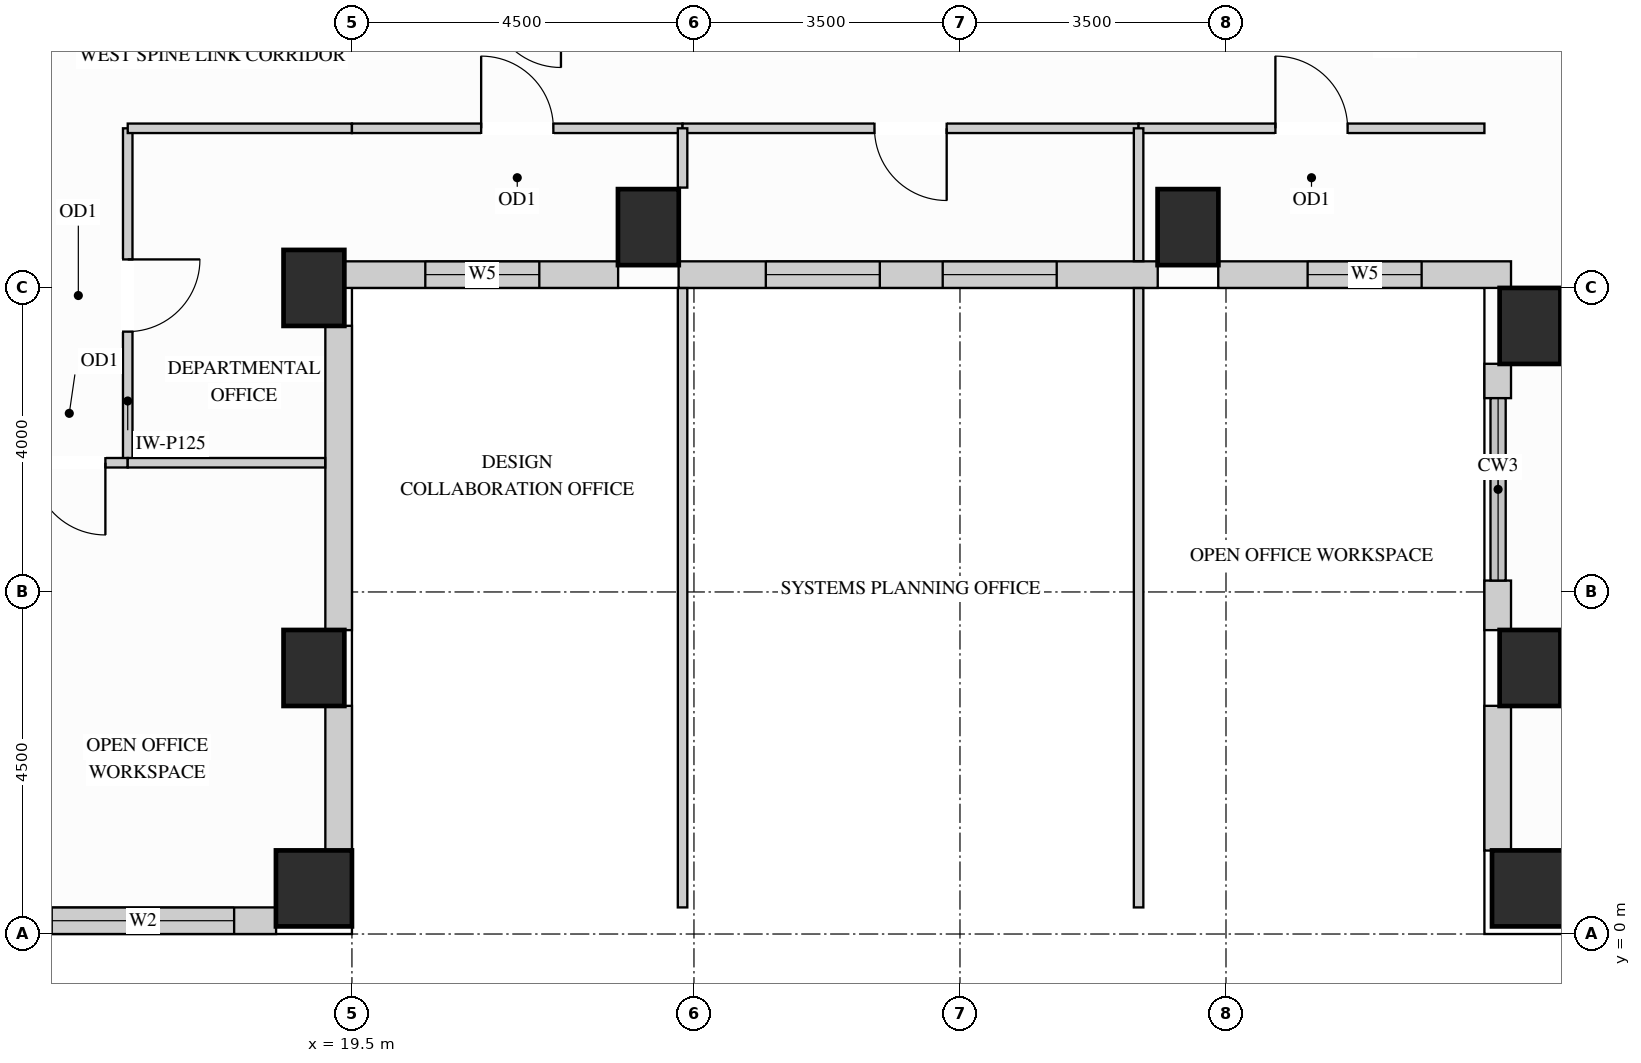
"""IFC4 building model, lengths in metres.
Left out: names, types, materials, properties, quantities, classifications, styles, units other than length and angle.
Written with IfcOpenShell. Run it as: python <this file> out.ifc"""

import sys

from ifc_helpers import new_model, si_unit, direction, frame, frame_2d, origin, origin_2d, place, context, subcontext, project, spatial, rectangle, extrude, source, transform, mapped, element, fill, save


model = new_model("IFC4")
c1 = context("Model", 3, precision=1e-05, world=origin(), true_north=direction((0.0, 1.0)))
c2 = subcontext(c1, "Body", "Model", "MODEL_VIEW")
j1 = project(units=[si_unit("LENGTHUNIT", "METRE"), si_unit("PLANEANGLEUNIT", "RADIAN")], contexts=[c1])
p1 = place(None, origin())
s1 = spatial("IfcSite", under=j1, at=p1, CompositionType="ELEMENT")
p2 = place(p1, origin())
s2 = spatial("IfcBuilding", under=s1, at=p2, CompositionType="ELEMENT")
p3 = place(p2, frame((0.0, 0.0, 204.3)))
s3 = spatial("IfcBuildingStorey", under=s2, at=p3, CompositionType="ELEMENT", Elevation=204.3)
m1 = source(origin(), c2, "Body", "SweptSolid", [
    extrude(rectangle(XDim=0.8, YDim=1.0, at=origin_2d()), origin(), (0.0, 0.0, 1.0), 3.32),
])
for number, where, z_axis, x_axis in (
    (1, (19.0, 3.5, 0.0), (0.0, 0.0, 1.0), (1.0, 0.0, 0.0)),
    (2, (19.0, 8.5, 0.0), (0.0, 0.0, 1.0), (1.0, 0.0, 0.0)),
    (3, (35.0, 3.5, 0.0), (0.0, 0.0, 1.0), (1.0, 0.0, 0.0)),
    (4, (35.0, 8.0, 0.0), (0.0, 0.0, 1.0), (1.0, 0.0, 0.0)),
    (5, (23.4, 9.3, 0.0), (0.0, 0.0, 1.0), (1.0, 0.0, 0.0)),
    (6, (30.5, 9.3, 0.0), (0.0, 0.0, 1.0), (1.0, 0.0, 0.0)),
):
    element("IfcColumn", number, at=place(p3, frame(where, z_axis=z_axis, x_axis=x_axis)), inside=s3, PredefinedType="COLUMN", context=c2, shape_type="MappedRepresentation", body=[
        mapped(m1, transform((0.0, 0.0, 0.0), x_axis=(1.0, 0.0, 0.0), y_axis=(0.0, 1.0, 0.0), z_axis=(0.0, 0.0, 1.0))),
    ])
m2 = source(origin(), c2, "Body", "SweptSolid", [
    extrude(rectangle(XDim=1.0, YDim=1.0, at=origin_2d()), origin(), (0.0, 0.0, 1.0), 3.32),
])
for number, where, z_axis, x_axis in (
    (7, (19.0, 0.6, 0.0), (0.0, 0.0, 1.0), (1.0, 0.0, 0.0)),
    (8, (35.0, 0.6, 0.0), (0.0, 0.0, 1.0), (1.0, 0.0, 0.0)),
):
    element("IfcColumn", number, at=place(p3, frame(where, z_axis=z_axis, x_axis=x_axis)), inside=s3, PredefinedType="COLUMN", context=c2, shape_type="MappedRepresentation", body=[
        mapped(m2, transform((0.0, 0.0, 0.0), x_axis=(1.0, 0.0, 0.0), y_axis=(0.0, 1.0, 0.0), z_axis=(0.0, 0.0, 1.0))),
    ])
p4 = place(p3, frame((14.998, 0.175, 0.0), z_axis=(0.0, 0.0, 1.0), x_axis=(1.0, 0.0, 0.0)))
e9 = element("IfcWall", 9, at=p4, inside=s3, PredefinedType="SOLIDWALL", context=c2, shape_type="SweptSolid", body=[
    extrude(rectangle(XDim=3.504, YDim=0.35, at=frame_2d((1.752, 0.0))), origin(), (0.0, 0.0, 1.0), 2.532),
])
p5 = place(p4, frame((0.552, 0.0, 0.78)))
e10 = element("IfcOpeningElement", 10, at=p5, cuts=e9, PredefinedType="OPENING", context=c2, shape_type="SweptSolid", body=[
    extrude(rectangle(XDim=2.4, YDim=1.572, at=frame_2d((1.2, 0.786))), frame((0.0, 0.185, 0.0), z_axis=(0.0, -1.0, 0.0), x_axis=(1.0, 0.0, 0.0)), (0.0, 0.0, 1.0), 0.37),
])
m3 = source(origin(), c2, "Body", "SweptSolid", [
    extrude(rectangle(XDim=1.904, YDim=0.35, at=frame_2d((0.952, 0.0))), origin(), (0.0, 0.0, 1.0), 2.532),
])
p6 = place(p3, frame((19.325, 1.098, 0.0), z_axis=(0.0, 0.0, 1.0), x_axis=(0.0, 1.0, 0.0)))
e11 = element("IfcWall", 11, at=p6, inside=s3, PredefinedType="SOLIDWALL", context=c2, shape_type="MappedRepresentation", body=[
    mapped(m3, transform((0.0, 0.0, 0.0), x_axis=(1.0, 0.0, 0.0), y_axis=(0.0, 1.0, 0.0), z_axis=(0.0, 0.0, 1.0))),
])
m4 = source(origin(), c2, "Body", "SweptSolid", [
    extrude(rectangle(XDim=4.004, YDim=0.35, at=frame_2d((2.002, 0.0))), origin(), (0.0, 0.0, 1.0), 2.532),
])
p7 = place(p3, frame((19.325, 3.998, 0.0), z_axis=(0.0, 0.0, 1.0), x_axis=(0.0, 1.0, 0.0)))
e12 = element("IfcWall", 12, at=p7, inside=s3, PredefinedType="SOLIDWALL", context=c2, shape_type="MappedRepresentation", body=[
    mapped(m4, transform((0.0, 0.0, 0.0), x_axis=(1.0, 0.0, 0.0), y_axis=(0.0, 1.0, 0.0), z_axis=(0.0, 0.0, 1.0))),
])
p8 = place(p3, frame((19.398, 8.675, 0.0), z_axis=(0.0, 0.0, 1.0), x_axis=(1.0, 0.0, 0.0)))
e13 = element("IfcWall", 13, at=p8, inside=s3, PredefinedType="SOLIDWALL", context=c2, shape_type="SweptSolid", body=[
    extrude(rectangle(XDim=3.604, YDim=0.35, at=frame_2d((1.802, 0.0))), origin(), (0.0, 0.0, 1.0), 3.305),
])
p9 = place(p8, frame((1.067, 0.0, 0.78)))
e14 = element("IfcOpeningElement", 14, at=p9, cuts=e13, PredefinedType="OPENING", context=c2, shape_type="SweptSolid", body=[
    extrude(rectangle(XDim=1.5, YDim=2.0, at=frame_2d((0.75, 1.0))), frame((0.0, 0.185, 0.0), z_axis=(0.0, -1.0, 0.0), x_axis=(1.0, 0.0, 0.0)), (0.0, 0.0, 1.0), 0.37),
])
p10 = place(p3, frame((23.798, 8.675, 0.0), z_axis=(0.0, 0.0, 1.0), x_axis=(1.0, 0.0, 0.0)))
e15 = element("IfcWall", 15, at=p10, inside=s3, PredefinedType="SOLIDWALL", context=c2, shape_type="SweptSolid", body=[
    extrude(rectangle(XDim=6.304, YDim=0.35, at=frame_2d((3.152, 0.0))), origin(), (0.0, 0.0, 1.0), 3.305),
])
p11 = place(p10, frame((1.147, 0.0, 0.78)))
e16 = element("IfcOpeningElement", 16, at=p11, cuts=e15, PredefinedType="OPENING", context=c2, shape_type="SweptSolid", body=[
    extrude(rectangle(XDim=1.5, YDim=2.0, at=frame_2d((0.75, 1.0))), frame((0.0, 0.185, 0.0), z_axis=(0.0, -1.0, 0.0), x_axis=(1.0, 0.0, 0.0)), (0.0, 0.0, 1.0), 0.37),
])
p12 = place(p10, frame((3.475, 0.0, 0.78)))
e17 = element("IfcOpeningElement", 17, at=p12, cuts=e15, PredefinedType="OPENING", context=c2, shape_type="SweptSolid", body=[
    extrude(rectangle(XDim=1.5, YDim=2.0, at=frame_2d((0.75, 1.0))), frame((0.0, 0.185, 0.0), z_axis=(0.0, -1.0, 0.0), x_axis=(1.0, 0.0, 0.0)), (0.0, 0.0, 1.0), 0.37),
])
p13 = place(p3, frame((30.898, 8.675, 0.0), z_axis=(0.0, 0.0, 1.0), x_axis=(1.0, 0.0, 0.0)))
e18 = element("IfcWall", 18, at=p13, inside=s3, PredefinedType="SOLIDWALL", context=c2, shape_type="SweptSolid", body=[
    extrude(rectangle(XDim=3.852, YDim=0.35, at=frame_2d((1.926, 0.0))), origin(), (0.0, 0.0, 1.0), 3.305),
])
p14 = place(p13, frame((1.176, 0.0, 0.78)))
e19 = element("IfcOpeningElement", 19, at=p14, cuts=e18, PredefinedType="OPENING", context=c2, shape_type="SweptSolid", body=[
    extrude(rectangle(XDim=1.5, YDim=2.0, at=frame_2d((0.75, 1.0))), frame((0.0, 0.185, 0.0), z_axis=(0.0, -1.0, 0.0), x_axis=(1.0, 0.0, 0.0)), (0.0, 0.0, 1.0), 0.37),
])
m5 = source(origin(), c2, "Body", "SweptSolid", [
    extrude(rectangle(XDim=0.452, YDim=0.35, at=frame_2d((0.226, 0.0))), origin(), (0.0, 0.0, 1.0), 2.532),
])
p15 = place(p3, frame((34.575, 7.502, 0.0), z_axis=(0.0, 0.0, 1.0), x_axis=(0.0, -1.0, 0.0)))
e20 = element("IfcWall", 20, at=p15, inside=s3, PredefinedType="SOLIDWALL", context=c2, shape_type="MappedRepresentation", body=[
    mapped(m5, transform((0.0, 0.0, 0.0), x_axis=(1.0, 0.0, 0.0), y_axis=(0.0, 1.0, 0.0), z_axis=(0.0, 0.0, 1.0))),
])
m6 = source(origin(), c2, "Body", "SweptSolid", [
    extrude(rectangle(XDim=0.652, YDim=0.35, at=frame_2d((0.326, 0.0))), origin(), (0.0, 0.0, 1.0), 2.532),
])
p16 = place(p3, frame((34.575, 4.65, 0.0), z_axis=(0.0, 0.0, 1.0), x_axis=(0.0, -1.0, 0.0)))
e21 = element("IfcWall", 21, at=p16, inside=s3, PredefinedType="SOLIDWALL", context=c2, shape_type="MappedRepresentation", body=[
    mapped(m6, transform((0.0, 0.0, 0.0), x_axis=(1.0, 0.0, 0.0), y_axis=(0.0, 1.0, 0.0), z_axis=(0.0, 0.0, 1.0))),
])
p17 = place(p3, frame((34.575, 3.002, 0.0), z_axis=(0.0, 0.0, 1.0), x_axis=(0.0, -1.0, 0.0)))
e22 = element("IfcWall", 22, at=p17, inside=s3, PredefinedType="SOLIDWALL", context=c2, shape_type="MappedRepresentation", body=[
    mapped(m3, transform((0.0, 0.0, 0.0), x_axis=(1.0, 0.0, 0.0), y_axis=(0.0, 1.0, 0.0), z_axis=(0.0, 0.0, 1.0))),
])
p18 = place(p3, frame((16.55, 6.2, 0.0), z_axis=(0.0, 0.0, 1.0), x_axis=(0.0, 1.0, 0.0)))
e23 = element("IfcWall", 23, at=p18, inside=s3, PredefinedType="PARTITIONING", context=c2, shape_type="SweptSolid", body=[
    extrude(rectangle(XDim=4.4, YDim=0.125, at=frame_2d((2.2, 0.0))), origin(), (0.0, 0.0, 1.0), 3.305),
])
p19 = place(p18, frame((1.725, 0.0, 0.0)))
e24 = element("IfcOpeningElement", 24, at=p19, cuts=e23, PredefinedType="OPENING", context=c2, shape_type="SweptSolid", body=[
    extrude(rectangle(XDim=0.95, YDim=2.15, at=frame_2d((0.475, 1.075))), frame((0.0, 0.073, 0.0), z_axis=(0.0, -1.0, 0.0), x_axis=(1.0, 0.0, 0.0)), (0.0, 0.0, 1.0), 0.145),
])
m7 = source(origin(), c2, "Body", "SweptSolid", [
    extrude(rectangle(XDim=2.95, YDim=0.125, at=frame_2d((1.475, 0.0))), origin(), (0.0, 0.0, 1.0), 3.305),
])
p20 = place(p3, frame((16.55, 10.6, 0.0), z_axis=(0.0, 0.0, 1.0), x_axis=(1.0, 0.0, 0.0)))
e25 = element("IfcWall", 25, at=p20, inside=s3, PredefinedType="PARTITIONING", context=c2, shape_type="MappedRepresentation", body=[
    mapped(m7, transform((0.0, 0.0, 0.0), x_axis=(1.0, 0.0, 0.0), y_axis=(0.0, 1.0, 0.0), z_axis=(0.0, 0.0, 1.0))),
])
p21 = place(p3, frame((19.5, 10.6, 0.0), z_axis=(0.0, 0.0, 1.0), x_axis=(1.0, 0.0, 0.0)))
e26 = element("IfcWall", 26, at=p21, inside=s3, PredefinedType="PARTITIONING", context=c2, shape_type="SweptSolid", body=[
    extrude(rectangle(XDim=4.35, YDim=0.125, at=frame_2d((2.175, 0.0))), origin(), (0.0, 0.0, 1.0), 3.305),
])
p22 = place(p21, frame((1.7, 0.0, 0.0)))
e27 = element("IfcOpeningElement", 27, at=p22, cuts=e26, PredefinedType="OPENING", context=c2, shape_type="SweptSolid", body=[
    extrude(rectangle(XDim=0.95, YDim=2.15, at=frame_2d((0.475, 1.075))), frame((0.0, 0.073, 0.0), z_axis=(0.0, -1.0, 0.0), x_axis=(1.0, 0.0, 0.0)), (0.0, 0.0, 1.0), 0.145),
])
p23 = place(p3, frame((23.85, 10.6, 0.0), z_axis=(0.0, 0.0, 1.0), x_axis=(1.0, 0.0, 0.0)))
e28 = element("IfcWall", 28, at=p23, inside=s3, PredefinedType="PARTITIONING", context=c2, shape_type="SweptSolid", body=[
    extrude(rectangle(XDim=6.0, YDim=0.125, at=frame_2d((3.0, 0.0))), origin(), (0.0, 0.0, 1.0), 3.305),
])
p24 = place(p23, frame((2.525, 0.0, 0.0)))
e29 = element("IfcOpeningElement", 29, at=p24, cuts=e28, PredefinedType="OPENING", context=c2, shape_type="SweptSolid", body=[
    extrude(rectangle(XDim=0.95, YDim=2.15, at=frame_2d((0.475, 1.075))), frame((0.0, 0.073, 0.0), z_axis=(0.0, -1.0, 0.0), x_axis=(1.0, 0.0, 0.0)), (0.0, 0.0, 1.0), 0.145),
])
p25 = place(p3, frame((29.85, 10.6, 0.0), z_axis=(0.0, 0.0, 1.0), x_axis=(1.0, 0.0, 0.0)))
e30 = element("IfcWall", 30, at=p25, inside=s3, PredefinedType="PARTITIONING", context=c2, shape_type="SweptSolid", body=[
    extrude(rectangle(XDim=4.55, YDim=0.125, at=frame_2d((2.275, 0.0))), origin(), (0.0, 0.0, 1.0), 3.305),
])
p26 = place(p25, frame((1.8, 0.0, 0.0)))
e31 = element("IfcOpeningElement", 31, at=p26, cuts=e30, PredefinedType="OPENING", context=c2, shape_type="SweptSolid", body=[
    extrude(rectangle(XDim=0.95, YDim=2.15, at=frame_2d((0.475, 1.075))), frame((0.0, 0.073, 0.0), z_axis=(0.0, -1.0, 0.0), x_axis=(1.0, 0.0, 0.0)), (0.0, 0.0, 1.0), 0.145),
])
m8 = source(origin(), c2, "Body", "SweptSolid", [
    extrude(rectangle(XDim=8.148, YDim=0.125, at=frame_2d((4.074, 0.0))), origin(), (0.0, 0.0, 1.0), 3.305),
])
p27 = place(p3, frame((23.85, 0.35, 0.0), z_axis=(0.0, 0.0, 1.0), x_axis=(0.0, 1.0, 0.0)))
e32 = element("IfcWall", 32, at=p27, inside=s3, PredefinedType="PARTITIONING", context=c2, shape_type="MappedRepresentation", body=[
    mapped(m8, transform((0.0, 0.0, 0.0), x_axis=(1.0, 0.0, 0.0), y_axis=(0.0, 1.0, 0.0), z_axis=(0.0, 0.0, 1.0))),
])
m9 = source(origin(), c2, "Body", "SweptSolid", [
    extrude(rectangle(XDim=0.78, YDim=0.125, at=frame_2d((0.39, 0.0))), origin(), (0.0, 0.0, 1.0), 3.305),
])
p28 = place(p3, frame((23.85, 9.82, 0.0), z_axis=(0.0, 0.0, 1.0), x_axis=(0.0, 1.0, 0.0)))
e33 = element("IfcWall", 33, at=p28, inside=s3, PredefinedType="PARTITIONING", context=c2, shape_type="MappedRepresentation", body=[
    mapped(m9, transform((0.0, 0.0, 0.0), x_axis=(1.0, 0.0, 0.0), y_axis=(0.0, 1.0, 0.0), z_axis=(0.0, 0.0, 1.0))),
])
p29 = place(p3, frame((29.85, 0.35, 0.0), z_axis=(0.0, 0.0, 1.0), x_axis=(0.0, 1.0, 0.0)))
e34 = element("IfcWall", 34, at=p29, inside=s3, PredefinedType="PARTITIONING", context=c2, shape_type="MappedRepresentation", body=[
    mapped(m8, transform((0.0, 0.0, 0.0), x_axis=(1.0, 0.0, 0.0), y_axis=(0.0, 1.0, 0.0), z_axis=(0.0, 0.0, 1.0))),
])
m10 = source(origin(), c2, "Body", "SweptSolid", [
    extrude(rectangle(XDim=1.748, YDim=0.125, at=frame_2d((0.874, 0.0))), origin(), (0.0, 0.0, 1.0), 3.305),
])
p30 = place(p3, frame((29.85, 8.852, 0.0), z_axis=(0.0, 0.0, 1.0), x_axis=(0.0, 1.0, 0.0)))
e35 = element("IfcWall", 35, at=p30, inside=s3, PredefinedType="PARTITIONING", context=c2, shape_type="MappedRepresentation", body=[
    mapped(m10, transform((0.0, 0.0, 0.0), x_axis=(1.0, 0.0, 0.0), y_axis=(0.0, 1.0, 0.0), z_axis=(0.0, 0.0, 1.0))),
])
p31 = place(p3, frame((15.012, 6.2, 0.0), z_axis=(0.0, 0.0, 1.0), x_axis=(1.0, 0.0, 0.0)))
e36 = element("IfcWall", 36, at=p31, inside=s3, PredefinedType="PARTITIONING", context=c2, shape_type="SweptSolid", body=[
    extrude(rectangle(XDim=1.538, YDim=0.125, at=frame_2d((0.769, 0.0))), origin(), (0.0, 0.0, 1.0), 2.768),
])
p32 = place(p31, frame((0.294, 0.0, 0.0)))
e37 = element("IfcOpeningElement", 37, at=p32, cuts=e36, PredefinedType="OPENING", context=c2, shape_type="SweptSolid", body=[
    extrude(rectangle(XDim=0.95, YDim=2.15, at=frame_2d((0.475, 1.075))), frame((0.0, 0.073, 0.0), z_axis=(0.0, -1.0, 0.0), x_axis=(1.0, 0.0, 0.0)), (0.0, 0.0, 1.0), 0.145),
])
m11 = source(origin(), c2, "Body", "SweptSolid", [
    extrude(rectangle(XDim=2.598, YDim=0.125, at=frame_2d((1.299, 0.0))), origin(), (0.0, 0.0, 1.0), 2.768),
])
p33 = place(p3, frame((16.55, 6.2, 0.0), z_axis=(0.0, 0.0, 1.0), x_axis=(1.0, 0.0, 0.0)))
e38 = element("IfcWall", 38, at=p33, inside=s3, PredefinedType="PARTITIONING", context=c2, shape_type="MappedRepresentation", body=[
    mapped(m11, transform((0.0, 0.0, 0.0), x_axis=(1.0, 0.0, 0.0), y_axis=(0.0, 1.0, 0.0), z_axis=(0.0, 0.0, 1.0))),
])
m12 = source(origin(), c2, "Body", "SweptSolid", [
    extrude(rectangle(XDim=0.95, YDim=2.15, at=frame_2d((0.475, 1.075))), frame((0.0, 0.025, 0.0), z_axis=(0.0, -1.0, 0.0), x_axis=(1.0, 0.0, 0.0)), (0.0, 0.0, 1.0), 0.05),
])
p34 = place(p19, origin())
e39 = element("IfcDoor", 39, at=p34, inside=s3, OperationType="SINGLE_SWING_RIGHT", PredefinedType="DOOR", context=c2, shape_type="MappedRepresentation", body=[
    mapped(m12, transform((0.0, 0.0, 0.0), x_axis=(1.0, 0.0, 0.0), y_axis=(0.0, 1.0, 0.0), z_axis=(0.0, 0.0, 1.0))),
])
fill(e24, e39)
p35 = place(p32, origin())
e40 = element("IfcDoor", 40, at=p35, inside=s3, OperationType="SINGLE_SWING_RIGHT", PredefinedType="DOOR", context=c2, shape_type="MappedRepresentation", body=[
    mapped(m12, transform((0.0, 0.0, 0.0), x_axis=(1.0, 0.0, 0.0), y_axis=(0.0, 1.0, 0.0), z_axis=(0.0, 0.0, 1.0))),
])
fill(e37, e40)
p36 = place(p22, origin())
e41 = element("IfcDoor", 41, at=p36, inside=s3, OperationType="SINGLE_SWING_LEFT", PredefinedType="DOOR", context=c2, shape_type="MappedRepresentation", body=[
    mapped(m12, transform((0.0, 0.0, 0.0), x_axis=(1.0, 0.0, 0.0), y_axis=(0.0, 1.0, 0.0), z_axis=(0.0, 0.0, 1.0))),
])
fill(e27, e41)
p37 = place(p24, origin())
e42 = element("IfcDoor", 42, at=p37, inside=s3, OperationType="SINGLE_SWING_RIGHT", PredefinedType="DOOR", context=c2, shape_type="MappedRepresentation", body=[
    mapped(m12, transform((0.0, 0.0, 0.0), x_axis=(1.0, 0.0, 0.0), y_axis=(0.0, 1.0, 0.0), z_axis=(0.0, 0.0, 1.0))),
])
fill(e29, e42)
p38 = place(p26, origin())
e43 = element("IfcDoor", 43, at=p38, inside=s3, OperationType="SINGLE_SWING_LEFT", PredefinedType="DOOR", context=c2, shape_type="MappedRepresentation", body=[
    mapped(m12, transform((0.0, 0.0, 0.0), x_axis=(1.0, 0.0, 0.0), y_axis=(0.0, 1.0, 0.0), z_axis=(0.0, 0.0, 1.0))),
])
fill(e31, e43)
m13 = source(origin(), c2, "Body", "SweptSolid", [
    extrude(rectangle(XDim=2.4, YDim=1.572, at=frame_2d((1.2, 0.786))), frame((0.0, 0.03, 0.0), z_axis=(0.0, -1.0, 0.0), x_axis=(1.0, 0.0, 0.0)), (0.0, 0.0, 1.0), 0.06),
])
p39 = place(p5, origin())
e44 = element("IfcWindow", 44, at=p39, inside=s3, PartitioningType="SINGLE_PANEL", PredefinedType="WINDOW", context=c2, shape_type="MappedRepresentation", body=[
    mapped(m13, transform((0.0, 0.0, 0.0), x_axis=(1.0, 0.0, 0.0), y_axis=(0.0, 1.0, 0.0), z_axis=(0.0, 0.0, 1.0))),
])
fill(e10, e44)
m14 = source(origin(), c2, "Body", "SweptSolid", [
    extrude(rectangle(XDim=1.5, YDim=2.0, at=frame_2d((0.75, 1.0))), frame((0.0, 0.03, 0.0), z_axis=(0.0, -1.0, 0.0), x_axis=(1.0, 0.0, 0.0)), (0.0, 0.0, 1.0), 0.06),
])
p40 = place(p9, origin())
e45 = element("IfcWindow", 45, at=p40, inside=s3, PartitioningType="SINGLE_PANEL", PredefinedType="WINDOW", context=c2, shape_type="MappedRepresentation", body=[
    mapped(m14, transform((0.0, 0.0, 0.0), x_axis=(1.0, 0.0, 0.0), y_axis=(0.0, 1.0, 0.0), z_axis=(0.0, 0.0, 1.0))),
])
fill(e14, e45)
p41 = place(p11, origin())
e46 = element("IfcWindow", 46, at=p41, inside=s3, PartitioningType="SINGLE_PANEL", PredefinedType="WINDOW", context=c2, shape_type="MappedRepresentation", body=[
    mapped(m14, transform((0.0, 0.0, 0.0), x_axis=(1.0, 0.0, 0.0), y_axis=(0.0, 1.0, 0.0), z_axis=(0.0, 0.0, 1.0))),
])
fill(e16, e46)
p42 = place(p12, origin())
e47 = element("IfcWindow", 47, at=p42, inside=s3, PartitioningType="SINGLE_PANEL", PredefinedType="WINDOW", context=c2, shape_type="MappedRepresentation", body=[
    mapped(m14, transform((0.0, 0.0, 0.0), x_axis=(1.0, 0.0, 0.0), y_axis=(0.0, 1.0, 0.0), z_axis=(0.0, 0.0, 1.0))),
])
fill(e17, e47)
p43 = place(p14, origin())
e48 = element("IfcWindow", 48, at=p43, inside=s3, PartitioningType="SINGLE_PANEL", PredefinedType="WINDOW", context=c2, shape_type="MappedRepresentation", body=[
    mapped(m14, transform((0.0, 0.0, 0.0), x_axis=(1.0, 0.0, 0.0), y_axis=(0.0, 1.0, 0.0), z_axis=(0.0, 0.0, 1.0))),
])
fill(e19, e48)
save(model, sys.argv[1])
